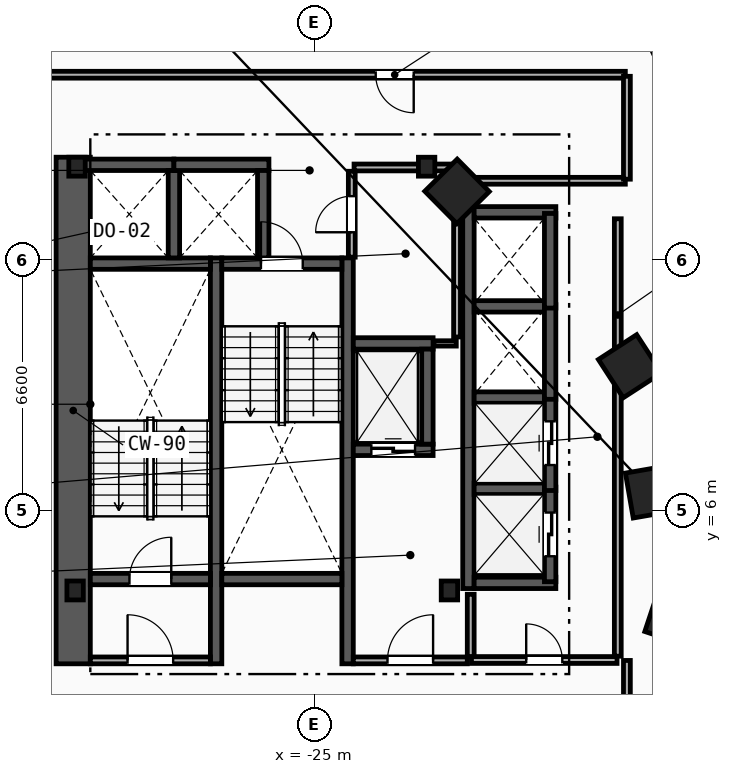
"""IFC4 building model, lengths in metres.
Left out: names, types, materials, properties, quantities, classifications, styles, units other than length and angle.
Written with IfcOpenShell. Run it as: python <this file> out.ifc"""

import sys

from ifc_helpers import new_model, si_unit, direction, frame, frame_2d, origin, origin_2d, place, context, subcontext, project, spatial, rectangle, i_section, extrude, element, fill, save


model = new_model("IFC4")
c1 = context("Model", 3, precision=1e-05, world=origin(), true_north=direction((0.0, 1.0)))
c2 = subcontext(c1, "Body", "Model", "MODEL_VIEW")
j1 = project(units=[si_unit("LENGTHUNIT", "METRE"), si_unit("PLANEANGLEUNIT", "RADIAN")], contexts=[c1])
p1 = place(None, origin())
s1 = spatial("IfcSite", under=j1, at=p1, CompositionType="ELEMENT")
p2 = place(p1, origin())
s2 = spatial("IfcBuilding", under=s1, at=p2, CompositionType="ELEMENT")
p3 = place(p2, frame((0.0, 0.0, 31.6)))
s3 = spatial("IfcBuildingStorey", under=s2, at=p3, CompositionType="ELEMENT", Elevation=31.6)
for number, where, z_axis, x_axis in (
    (1, (-31.3, 3.9, 0.0), (0.0, 0.0, 1.0), (1.0, 0.0, 0.0)),
    (2, (-21.45, 3.9, 0.0), (0.0, 0.0, 1.0), (1.0, 0.0, 0.0)),
    (3, (-22.05, 15.05, 0.0), (0.0, 0.0, 1.0), (1.0, 0.0, 0.0)),
    (4, (-31.25, 15.05, 0.0), (0.0, 0.0, 1.0), (1.0, 0.0, 0.0)),
):
    element("IfcColumn", number, at=place(p3, frame(where, z_axis=z_axis, x_axis=x_axis)), inside=s3, PredefinedType="COLUMN", context=c2, shape_type="SweptSolid", body=[
        extrude(i_section(OverallWidth=0.432, OverallDepth=0.498, WebThickness=0.056, FlangeThickness=0.089, FilletRadius=0.018, at=origin_2d()), origin(), (0.0, 0.0, 1.0), 3.8),
    ])
for number, where, z_axis, x_axis in (
    (5, (-15.55, 3.2, 0.0), (0.0, 0.0, 1.0), (0.315, 0.949, 0.0)),
    (6, (-16.125, 6.5, 0.0), (0.0, 0.0, 1.0), (-0.172, 0.985, 0.0)),
    (7, (-16.7, 9.8, 0.0), (0.0, 0.0, 1.0), (-0.544, 0.839, 0.0)),
    (8, (-21.25, 14.4, 0.0), (0.0, 0.0, 1.0), (-0.703, 0.711, 0.0)),
):
    element("IfcColumn", number, at=place(p3, frame(where, z_axis=z_axis, x_axis=x_axis)), inside=s3, PredefinedType="COLUMN", context=c2, shape_type="SweptSolid", body=[
        extrude(rectangle(XDim=1.2, YDim=1.2, at=origin_2d()), origin(), (0.0, 0.0, 1.0), 3.8),
    ])
p4 = place(p3, frame((-31.35, 1.97, 0.0), z_axis=(0.0, 0.0, 1.0), x_axis=(0.0, 1.0, 0.0)))
e9 = element("IfcWall", 9, at=p4, inside=s3, PredefinedType="SHEAR", context=c2, shape_type="SweptSolid", body=[
    extrude(rectangle(XDim=13.33, YDim=0.9, at=frame_2d((6.665, 0.0))), origin(), (0.0, 0.0, 1.0), 3.5),
])
for number, where, z_axis, x_axis in (
    (10, (-27.59, 1.97, 0.0), (0.0, 0.0, 1.0), (0.0, 1.0, 0.0)),
    (11, (-24.13, 1.97, 0.0), (0.0, 0.0, 1.0), (0.0, 1.0, 0.0)),
):
    element("IfcWall", number, at=place(p3, frame(where, z_axis=z_axis, x_axis=x_axis)), inside=s3, PredefinedType="SHEAR", context=c2, shape_type="SweptSolid", body=[
        extrude(rectangle(XDim=10.68, YDim=0.3, at=frame_2d((5.34, 0.0))), origin(), (0.0, 0.0, 1.0), 3.5),
    ])
p5 = place(p3, frame((-30.9, 4.2, 0.0), z_axis=(0.0, 0.0, 1.0), x_axis=(1.0, 0.0, 0.0)))
e12 = element("IfcWall", 12, at=p5, inside=s3, PredefinedType="SHEAR", context=c2, shape_type="SweptSolid", body=[
    extrude(rectangle(XDim=3.16, YDim=0.3, at=frame_2d((1.58, 0.0))), origin(), (0.0, 0.0, 1.0), 3.5),
])
p6 = place(p5, frame((1.03, 0.0, 0.0)))
e13 = element("IfcOpeningElement", 13, at=p6, cuts=e12, PredefinedType="OPENING", context=c2, shape_type="SweptSolid", body=[
    extrude(rectangle(XDim=1.1, YDim=2.15, at=frame_2d((0.55, 1.075))), frame((0.0, 0.16, 0.0), z_axis=(0.0, -1.0, 0.0), x_axis=(1.0, 0.0, 0.0)), (0.0, 0.0, 1.0), 0.32),
])
p7 = place(p3, frame((-30.9, 12.5, 0.0), z_axis=(0.0, 0.0, 1.0), x_axis=(1.0, 0.0, 0.0)))
e14 = element("IfcWall", 14, at=p7, inside=s3, PredefinedType="SHEAR", context=c2, shape_type="SweptSolid", body=[
    extrude(rectangle(XDim=3.16, YDim=0.3, at=frame_2d((1.58, 0.0))), origin(), (0.0, 0.0, 1.0), 3.5),
])
p8 = place(p3, frame((-27.44, 12.5, 0.0), z_axis=(0.0, 0.0, 1.0), x_axis=(1.0, 0.0, 0.0)))
e15 = element("IfcWall", 15, at=p8, inside=s3, PredefinedType="SHEAR", context=c2, shape_type="SweptSolid", body=[
    extrude(rectangle(XDim=3.16, YDim=0.3, at=frame_2d((1.58, 0.0))), origin(), (0.0, 0.0, 1.0), 3.5),
])
p9 = place(p8, frame((1.03, 0.0, 0.0)))
e16 = element("IfcOpeningElement", 16, at=p9, cuts=e15, PredefinedType="OPENING", context=c2, shape_type="SweptSolid", body=[
    extrude(rectangle(XDim=1.1, YDim=2.15, at=frame_2d((0.55, 1.075))), frame((0.0, 0.16, 0.0), z_axis=(0.0, -1.0, 0.0), x_axis=(1.0, 0.0, 0.0)), (0.0, 0.0, 1.0), 0.32),
])
p10 = place(p3, frame((-27.44, 4.2, 0.0), z_axis=(0.0, 0.0, 1.0), x_axis=(1.0, 0.0, 0.0)))
e17 = element("IfcWall", 17, at=p10, inside=s3, PredefinedType="SHEAR", context=c2, shape_type="SweptSolid", body=[
    extrude(rectangle(XDim=3.16, YDim=0.3, at=frame_2d((1.58, 0.0))), origin(), (0.0, 0.0, 1.0), 3.5),
])
p11 = place(p3, frame((-20.89, 2.15, 0.0), z_axis=(0.0, 0.0, 1.0), x_axis=(0.0, 1.0, 0.0)))
e18 = element("IfcWall", 18, at=p11, inside=s3, PredefinedType="PARTITIONING", context=c2, shape_type="SweptSolid", body=[
    extrude(rectangle(XDim=1.65, YDim=0.18, at=frame_2d((0.825, 0.0))), origin(), (0.0, 0.0, 1.0), 3.5),
])
p12 = place(p3, frame((-23.98, 2.06, 0.0), z_axis=(0.0, 0.0, 1.0), x_axis=(1.0, 0.0, 0.0)))
e19 = element("IfcWall", 19, at=p12, inside=s3, PredefinedType="PARTITIONING", context=c2, shape_type="SweptSolid", body=[
    extrude(rectangle(XDim=3.0, YDim=0.18, at=frame_2d((1.5, 0.0))), origin(), (0.0, 0.0, 1.0), 3.5),
])
p13 = place(p12, frame((0.9, 0.0, 0.0)))
e20 = element("IfcOpeningElement", 20, at=p13, cuts=e19, PredefinedType="OPENING", context=c2, shape_type="SweptSolid", body=[
    extrude(rectangle(XDim=1.2, YDim=2.15, at=frame_2d((0.6, 1.075))), frame((0.0, 0.1, 0.0), z_axis=(0.0, -1.0, 0.0), x_axis=(1.0, 0.0, 0.0)), (0.0, 0.0, 1.0), 0.2),
])
p14 = place(p3, frame((-30.9, 2.06, 0.0), z_axis=(0.0, 0.0, 1.0), x_axis=(1.0, 0.0, 0.0)))
e21 = element("IfcWall", 21, at=p14, inside=s3, PredefinedType="PARTITIONING", context=c2, shape_type="SweptSolid", body=[
    extrude(rectangle(XDim=3.16, YDim=0.18, at=frame_2d((1.58, 0.0))), origin(), (0.0, 0.0, 1.0), 3.5),
])
p15 = place(p14, frame((0.98, 0.0, 0.0)))
e22 = element("IfcOpeningElement", 22, at=p15, cuts=e21, PredefinedType="OPENING", context=c2, shape_type="SweptSolid", body=[
    extrude(rectangle(XDim=1.2, YDim=2.15, at=frame_2d((0.6, 1.075))), frame((0.0, 0.1, 0.0), z_axis=(0.0, -1.0, 0.0), x_axis=(1.0, 0.0, 0.0)), (0.0, 0.0, 1.0), 0.2),
])
p16 = place(p3, frame((-23.98, 7.6, 0.0), z_axis=(0.0, 0.0, 1.0), x_axis=(1.0, 0.0, 0.0)))
e23 = element("IfcWall", 23, at=p16, inside=s3, PredefinedType="SHEAR", context=c2, shape_type="SweptSolid", body=[
    extrude(rectangle(XDim=2.1, YDim=0.3, at=frame_2d((1.05, 0.0))), origin(), (0.0, 0.0, 1.0), 3.5),
])
p17 = place(p16, frame((0.475, 0.0, 0.0)))
e24 = element("IfcOpeningElement", 24, at=p17, cuts=e23, PredefinedType="OPENING", context=c2, shape_type="SweptSolid", body=[
    extrude(rectangle(XDim=1.15, YDim=2.2, at=frame_2d((0.575, 1.1))), frame((0.0, 0.16, 0.0), z_axis=(0.0, -1.0, 0.0), x_axis=(1.0, 0.0, 0.0)), (0.0, 0.0, 1.0), 0.32),
])
p18 = place(p3, frame((-23.98, 10.4, 0.0), z_axis=(0.0, 0.0, 1.0), x_axis=(1.0, 0.0, 0.0)))
e25 = element("IfcWall", 25, at=p18, inside=s3, PredefinedType="SHEAR", context=c2, shape_type="SweptSolid", body=[
    extrude(rectangle(XDim=2.1, YDim=0.3, at=frame_2d((1.05, 0.0))), origin(), (0.0, 0.0, 1.0), 3.5),
])
for number, where, z_axis, x_axis in (
    (26, (-22.03, 7.75, 0.0), (0.0, 0.0, 1.0), (0.0, 1.0, 0.0)),
    (27, (-31.2, 15.1, 0.0), (0.0, 0.0, 1.0), (1.0, 0.0, 0.0)),
):
    element("IfcWall", number, at=place(p3, frame(where, z_axis=z_axis, x_axis=x_axis)), inside=s3, PredefinedType="SHEAR", context=c2, shape_type="SweptSolid", body=[
        extrude(rectangle(XDim=2.5, YDim=0.3, at=frame_2d((1.25, 0.0))), origin(), (0.0, 0.0, 1.0), 3.5),
    ])
p19 = place(p3, frame((-28.7, 12.65, 0.0), z_axis=(0.0, 0.0, 1.0), x_axis=(0.0, 1.0, 0.0)))
e28 = element("IfcWall", 28, at=p19, inside=s3, PredefinedType="SHEAR", context=c2, shape_type="SweptSolid", body=[
    extrude(rectangle(XDim=2.3, YDim=0.3, at=frame_2d((1.15, 0.0))), origin(), (0.0, 0.0, 1.0), 3.5),
])
p20 = place(p3, frame((-28.7, 15.1, 0.0), z_axis=(0.0, 0.0, 1.0), x_axis=(1.0, 0.0, 0.0)))
e29 = element("IfcWall", 29, at=p20, inside=s3, PredefinedType="SHEAR", context=c2, shape_type="SweptSolid", body=[
    extrude(rectangle(XDim=2.5, YDim=0.3, at=frame_2d((1.25, 0.0))), origin(), (0.0, 0.0, 1.0), 3.5),
])
p21 = place(p3, frame((-26.35, 12.65, 0.0), z_axis=(0.0, 0.0, 1.0), x_axis=(0.0, 1.0, 0.0)))
e30 = element("IfcWall", 30, at=p21, inside=s3, PredefinedType="SHEAR", context=c2, shape_type="SweptSolid", body=[
    extrude(rectangle(XDim=2.3, YDim=0.3, at=frame_2d((1.15, 0.0))), origin(), (0.0, 0.0, 1.0), 3.5),
])
p22 = place(p3, frame((-20.95, 3.95, 0.0), z_axis=(0.0, 0.0, 1.0), x_axis=(0.0, 1.0, 0.0)))
e31 = element("IfcWall", 31, at=p22, inside=s3, PredefinedType="SHEAR", context=c2, shape_type="SweptSolid", body=[
    extrude(rectangle(XDim=10.05, YDim=0.3, at=frame_2d((5.025, 0.0))), origin(), (0.0, 0.0, 1.0), 3.5),
])
for number, where, z_axis, x_axis in (
    (32, (-20.8, 4.1, 0.0), (0.0, 0.0, 1.0), (1.0, 0.0, 0.0)),
    (33, (-20.8, 13.85, 0.0), (0.0, 0.0, 1.0), (1.0, 0.0, 0.0)),
):
    element("IfcWall", number, at=place(p3, frame(where, z_axis=z_axis, x_axis=x_axis)), inside=s3, PredefinedType="SHEAR", context=c2, shape_type="SweptSolid", body=[
        extrude(rectangle(XDim=2.15, YDim=0.3, at=frame_2d((1.075, 0.0))), origin(), (0.0, 0.0, 1.0), 3.5),
    ])
for number, where, z_axis, x_axis in (
    (34, (-20.8, 6.575, 0.0), (0.0, 0.0, 1.0), (1.0, 0.0, 0.0)),
    (35, (-20.8, 8.975, 0.0), (0.0, 0.0, 1.0), (1.0, 0.0, 0.0)),
    (36, (-20.8, 11.375, 0.0), (0.0, 0.0, 1.0), (1.0, 0.0, 0.0)),
):
    element("IfcWall", number, at=place(p3, frame(where, z_axis=z_axis, x_axis=x_axis)), inside=s3, PredefinedType="SHEAR", context=c2, shape_type="SweptSolid", body=[
        extrude(rectangle(XDim=1.85, YDim=0.3, at=frame_2d((0.925, 0.0))), origin(), (0.0, 0.0, 1.0), 3.5),
    ])
p23 = place(p3, frame((-18.8, 4.13, 0.0), z_axis=(0.0, 0.0, 1.0), x_axis=(0.0, 1.0, 0.0)))
e37 = element("IfcWall", 37, at=p23, inside=s3, PredefinedType="SHEAR", context=c2, shape_type="SweptSolid", body=[
    extrude(rectangle(XDim=2.49, YDim=0.3, at=frame_2d((1.245, 0.0))), origin(), (0.0, 0.0, 1.0), 3.5),
])
p24 = place(p23, frame((0.67, 0.0, 0.0)))
e38 = element("IfcOpeningElement", 38, at=p24, cuts=e37, PredefinedType="OPENING", context=c2, shape_type="SweptSolid", body=[
    extrude(rectangle(XDim=1.15, YDim=2.2, at=frame_2d((0.575, 1.1))), frame((0.0, 0.16, 0.0), z_axis=(0.0, -1.0, 0.0), x_axis=(1.0, 0.0, 0.0)), (0.0, 0.0, 1.0), 0.32),
])
p25 = place(p3, frame((-18.8, 6.53, 0.0), z_axis=(0.0, 0.0, 1.0), x_axis=(0.0, 1.0, 0.0)))
e39 = element("IfcWall", 39, at=p25, inside=s3, PredefinedType="SHEAR", context=c2, shape_type="SweptSolid", body=[
    extrude(rectangle(XDim=2.49, YDim=0.3, at=frame_2d((1.245, 0.0))), origin(), (0.0, 0.0, 1.0), 3.5),
])
p26 = place(p25, frame((0.67, 0.0, 0.0)))
e40 = element("IfcOpeningElement", 40, at=p26, cuts=e39, PredefinedType="OPENING", context=c2, shape_type="SweptSolid", body=[
    extrude(rectangle(XDim=1.15, YDim=2.2, at=frame_2d((0.575, 1.1))), frame((0.0, 0.16, 0.0), z_axis=(0.0, -1.0, 0.0), x_axis=(1.0, 0.0, 0.0)), (0.0, 0.0, 1.0), 0.32),
])
for number, where, z_axis, x_axis in (
    (41, (-18.8, 8.93, 0.0), (0.0, 0.0, 1.0), (0.0, 1.0, 0.0)),
    (42, (-18.8, 11.33, 0.0), (0.0, 0.0, 1.0), (0.0, 1.0, 0.0)),
):
    element("IfcWall", number, at=place(p3, frame(where, z_axis=z_axis, x_axis=x_axis)), inside=s3, PredefinedType="SHEAR", context=c2, shape_type="SweptSolid", body=[
        extrude(rectangle(XDim=2.49, YDim=0.3, at=frame_2d((1.245, 0.0))), origin(), (0.0, 0.0, 1.0), 3.5),
    ])
p27 = place(p3, frame((-17.02, 2.17, 0.0), z_axis=(0.0, 0.0, 1.0), x_axis=(0.0, 1.0, 0.0)))
e43 = element("IfcWall", 43, at=p27, inside=s3, PredefinedType="PARTITIONING", context=c2, shape_type="SweptSolid", body=[
    extrude(rectangle(XDim=11.51, YDim=0.18, at=frame_2d((5.755, 0.0))), origin(), (0.0, 0.0, 1.0), 3.5),
])
p28 = place(p3, frame((-20.87, 2.07, 0.0), z_axis=(0.0, 0.0, 1.0), x_axis=(1.0, 0.0, 0.0)))
e44 = element("IfcWall", 44, at=p28, inside=s3, PredefinedType="PARTITIONING", context=c2, shape_type="SweptSolid", body=[
    extrude(rectangle(XDim=3.83, YDim=0.18, at=frame_2d((1.915, 0.0))), origin(), (0.0, 0.0, 1.0), 3.5),
])
p29 = place(p28, frame((1.44, 0.0, 0.0)))
e45 = element("IfcOpeningElement", 45, at=p29, cuts=e44, PredefinedType="OPENING", context=c2, shape_type="SweptSolid", body=[
    extrude(rectangle(XDim=0.95, YDim=2.1, at=frame_2d((0.475, 1.05))), frame((0.0, 0.1, 0.0), z_axis=(0.0, -1.0, 0.0), x_axis=(1.0, 0.0, 0.0)), (0.0, 0.0, 1.0), 0.2),
])
p30 = place(p3, frame((-21.86, 10.4, 0.0), z_axis=(0.0, 0.0, 1.0), x_axis=(1.0, 0.0, 0.0)))
e46 = element("IfcWall", 46, at=p30, inside=s3, PredefinedType="PARTITIONING", context=c2, shape_type="SweptSolid", body=[
    extrude(rectangle(XDim=0.59, YDim=0.14, at=frame_2d((0.295, 0.0))), origin(), (0.0, 0.0, 1.0), 3.5),
])
p31 = place(p3, frame((-21.25, 10.57, 0.0), z_axis=(0.0, 0.0, 1.0), x_axis=(0.0, 1.0, 0.0)))
e47 = element("IfcWall", 47, at=p31, inside=s3, PredefinedType="PARTITIONING", context=c2, shape_type="SweptSolid", body=[
    extrude(rectangle(XDim=4.36, YDim=0.18, at=frame_2d((2.18, 0.0))), origin(), (0.0, 0.0, 1.0), 3.5),
])
p32 = place(p3, frame((-23.96, 15.03, 0.0), z_axis=(0.0, 0.0, 1.0), x_axis=(1.0, 0.0, 0.0)))
e48 = element("IfcWall", 48, at=p32, inside=s3, PredefinedType="PARTITIONING", context=c2, shape_type="SweptSolid", body=[
    extrude(rectangle(XDim=2.61, YDim=0.18, at=frame_2d((1.305, 0.0))), origin(), (0.0, 0.0, 1.0), 2.573),
])
p33 = place(p3, frame((-24.02, 12.67, 0.0), z_axis=(0.0, 0.0, 1.0), x_axis=(0.0, 1.0, 0.0)))
e49 = element("IfcWall", 49, at=p33, inside=s3, PredefinedType="PARTITIONING", context=c2, shape_type="SweptSolid", body=[
    extrude(rectangle(XDim=2.26, YDim=0.18, at=frame_2d((1.13, 0.0))), origin(), (0.0, 0.0, 1.0), 3.5),
])
p34 = place(p33, frame((0.655, 0.0, 0.0)))
e50 = element("IfcOpeningElement", 50, at=p34, cuts=e49, PredefinedType="OPENING", context=c2, shape_type="SweptSolid", body=[
    extrude(rectangle(XDim=0.95, YDim=2.1, at=frame_2d((0.475, 1.05))), frame((0.0, 0.1, 0.0), z_axis=(0.0, -1.0, 0.0), x_axis=(1.0, 0.0, 0.0)), (0.0, 0.0, 1.0), 0.2),
])
p35 = place(p3, frame((-16.822, 17.47, 0.0), z_axis=(0.0, 0.0, 1.0), x_axis=(-1.0, 0.0, 0.0)))
e51 = element("IfcWall", 51, at=p35, inside=s3, PredefinedType="PARTITIONING", context=c2, shape_type="SweptSolid", body=[
    extrude(rectangle(XDim=16.807, YDim=0.18, at=frame_2d((8.403, 0.0))), origin(), (0.0, 0.0, 1.0), 3.5),
])
p36 = place(p35, frame((5.569, 0.0, 0.0)))
e52 = element("IfcOpeningElement", 52, at=p36, cuts=e51, PredefinedType="OPENING", context=c2, shape_type="SweptSolid", body=[
    extrude(rectangle(XDim=1.0, YDim=2.15, at=frame_2d((0.5, 1.075))), frame((0.0, 0.1, 0.0), z_axis=(0.0, -1.0, 0.0), x_axis=(1.0, 0.0, 0.0)), (0.0, 0.0, 1.0), 0.2),
])
p37 = place(p3, frame((-21.178, 14.68, 0.0), z_axis=(0.0, 0.0, 1.0), x_axis=(1.0, 0.0, 0.0)))
e53 = element("IfcWall", 53, at=p37, inside=s3, PredefinedType="PARTITIONING", context=c2, shape_type="SweptSolid", body=[
    extrude(rectangle(XDim=4.357, YDim=0.18, at=frame_2d((2.178, 0.0))), origin(), (0.0, 0.0, 1.0), 3.5),
])
p38 = place(p3, frame((-16.78, 14.721, 0.0), z_axis=(0.0, 0.0, 1.0), x_axis=(0.0, 1.0, 0.0)))
e54 = element("IfcWall", 54, at=p38, inside=s3, PredefinedType="PARTITIONING", context=c2, shape_type="SweptSolid", body=[
    extrude(rectangle(XDim=2.707, YDim=0.18, at=frame_2d((1.354, 0.0))), origin(), (0.0, 0.0, 1.0), 3.5),
])
p39 = place(p3, frame((-16.78, -0.329, 0.0), z_axis=(0.0, 0.0, 1.0), x_axis=(0.0, 1.0, 0.0)))
e55 = element("IfcWall", 55, at=p39, inside=s3, PredefinedType="PARTITIONING", context=c2, shape_type="SweptSolid", body=[
    extrude(rectangle(XDim=2.387, YDim=0.18, at=frame_2d((1.194, 0.0))), origin(), (0.0, 0.0, 1.0), 3.5),
])
p40 = place(p6, origin())
e56 = element("IfcDoor", 56, at=p40, inside=s3, OperationType="SINGLE_SWING_RIGHT", PredefinedType="DOOR", context=c2, shape_type="SweptSolid", body=[
    extrude(rectangle(XDim=1.1, YDim=2.15, at=frame_2d((0.55, 1.075))), frame((0.0, 0.025, 0.0), z_axis=(0.0, -1.0, 0.0), x_axis=(1.0, 0.0, 0.0)), (0.0, 0.0, 1.0), 0.05),
])
fill(e13, e56)
p41 = place(p9, origin())
e57 = element("IfcDoor", 57, at=p41, inside=s3, OperationType="SINGLE_SWING_LEFT", PredefinedType="DOOR", context=c2, shape_type="SweptSolid", body=[
    extrude(rectangle(XDim=1.1, YDim=2.15, at=frame_2d((0.55, 1.075))), frame((0.0, 0.025, 0.0), z_axis=(0.0, -1.0, 0.0), x_axis=(1.0, 0.0, 0.0)), (0.0, 0.0, 1.0), 0.05),
])
fill(e16, e57)
p42 = place(p13, origin())
e58 = element("IfcDoor", 58, at=p42, inside=s3, OperationType="SINGLE_SWING_RIGHT", PredefinedType="DOOR", context=c2, shape_type="SweptSolid", body=[
    extrude(rectangle(XDim=1.2, YDim=2.15, at=frame_2d((0.6, 1.075))), frame((0.0, 0.025, 0.0), z_axis=(0.0, -1.0, 0.0), x_axis=(1.0, 0.0, 0.0)), (0.0, 0.0, 1.0), 0.05),
])
fill(e20, e58)
p43 = place(p15, origin())
e59 = element("IfcDoor", 59, at=p43, inside=s3, OperationType="SINGLE_SWING_LEFT", PredefinedType="DOOR", context=c2, shape_type="SweptSolid", body=[
    extrude(rectangle(XDim=1.2, YDim=2.15, at=frame_2d((0.6, 1.075))), frame((0.0, 0.025, 0.0), z_axis=(0.0, -1.0, 0.0), x_axis=(1.0, 0.0, 0.0)), (0.0, 0.0, 1.0), 0.05),
])
fill(e22, e59)
p44 = place(p17, origin())
e60 = element("IfcDoor", 60, at=p44, inside=s3, OperationType="SLIDING_TO_LEFT", PredefinedType="TRAPDOOR", context=c2, shape_type="SweptSolid", body=[
    extrude(rectangle(XDim=1.15, YDim=2.2, at=frame_2d((0.575, 1.1))), frame((0.0, 0.025, 0.0), z_axis=(0.0, -1.0, 0.0), x_axis=(1.0, 0.0, 0.0)), (0.0, 0.0, 1.0), 0.05),
])
fill(e24, e60)
p45 = place(p24, origin())
e61 = element("IfcDoor", 61, at=p45, inside=s3, OperationType="SLIDING_TO_LEFT", PredefinedType="TRAPDOOR", context=c2, shape_type="SweptSolid", body=[
    extrude(rectangle(XDim=1.15, YDim=2.2, at=frame_2d((0.575, 1.1))), frame((0.0, 0.025, 0.0), z_axis=(0.0, -1.0, 0.0), x_axis=(1.0, 0.0, 0.0)), (0.0, 0.0, 1.0), 0.05),
])
fill(e38, e61)
p46 = place(p26, origin())
e62 = element("IfcDoor", 62, at=p46, inside=s3, OperationType="SLIDING_TO_LEFT", PredefinedType="TRAPDOOR", context=c2, shape_type="SweptSolid", body=[
    extrude(rectangle(XDim=1.15, YDim=2.2, at=frame_2d((0.575, 1.1))), frame((0.0, 0.025, 0.0), z_axis=(0.0, -1.0, 0.0), x_axis=(1.0, 0.0, 0.0)), (0.0, 0.0, 1.0), 0.05),
])
fill(e40, e62)
p47 = place(p36, origin())
e63 = element("IfcDoor", 63, at=p47, inside=s3, OperationType="SINGLE_SWING_LEFT", PredefinedType="DOOR", context=c2, shape_type="SweptSolid", body=[
    extrude(rectangle(XDim=1.0, YDim=2.15, at=frame_2d((0.5, 1.075))), frame((0.0, 0.025, 0.0), z_axis=(0.0, -1.0, 0.0), x_axis=(1.0, 0.0, 0.0)), (0.0, 0.0, 1.0), 0.05),
])
fill(e52, e63)
p48 = place(p29, origin())
e64 = element("IfcDoor", 64, at=p48, inside=s3, OperationType="SINGLE_SWING_LEFT", PredefinedType="DOOR", context=c2, shape_type="SweptSolid", body=[
    extrude(rectangle(XDim=0.95, YDim=2.1, at=frame_2d((0.475, 1.05))), frame((0.0, 0.025, 0.0), z_axis=(0.0, -1.0, 0.0), x_axis=(1.0, 0.0, 0.0)), (0.0, 0.0, 1.0), 0.05),
])
fill(e45, e64)
p49 = place(p34, origin())
e65 = element("IfcDoor", 65, at=p49, inside=s3, OperationType="SINGLE_SWING_LEFT", PredefinedType="DOOR", context=c2, shape_type="SweptSolid", body=[
    extrude(rectangle(XDim=0.95, YDim=2.1, at=frame_2d((0.475, 1.05))), frame((0.0, 0.025, 0.0), z_axis=(0.0, -1.0, 0.0), x_axis=(1.0, 0.0, 0.0)), (0.0, 0.0, 1.0), 0.05),
])
fill(e50, e65)
save(model, sys.argv[1])
